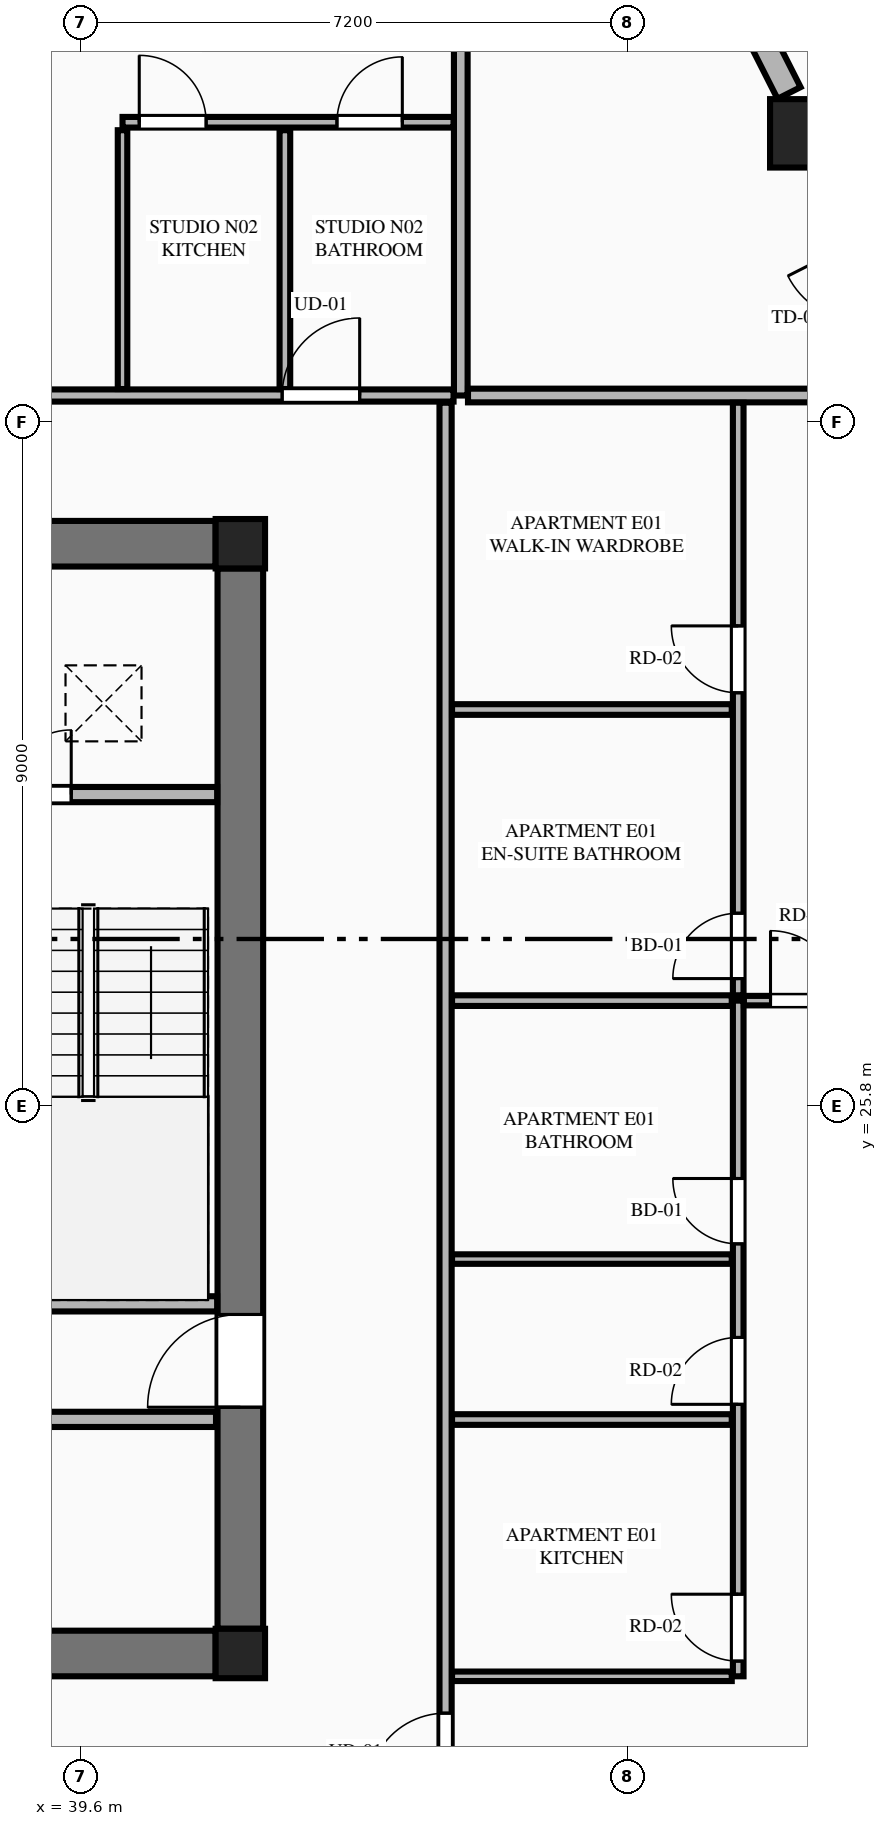
"""IFC4 building model, lengths in metres.
Left out: names, types, materials, properties, quantities, classifications, styles, units other than length and angle.
Written with IfcOpenShell. Run it as: python <this file> out.ifc"""

import sys

from ifc_helpers import new_model, si_unit, direction, frame, frame_2d, origin, origin_2d, place, context, subcontext, project, spatial, rectangle, extrude, element, fill, save


model = new_model("IFC4")
c1 = context("Model", 3, precision=1e-05, world=origin(), true_north=direction((0.0, 1.0)))
c2 = subcontext(c1, "Body", "Model", "MODEL_VIEW")
j1 = project(units=[si_unit("LENGTHUNIT", "METRE"), si_unit("PLANEANGLEUNIT", "RADIAN")], contexts=[c1])
p1 = place(None, origin())
s1 = spatial("IfcSite", under=j1, at=p1, CompositionType="ELEMENT")
p2 = place(p1, origin())
s2 = spatial("IfcBuilding", under=s1, at=p2, CompositionType="ELEMENT")
p3 = place(p2, frame((0.0, 0.0, 175.45)))
s3 = spatial("IfcBuildingStorey", under=s2, at=p3, CompositionType="ELEMENT", Elevation=175.45)
for number, where, z_axis, x_axis in (
    (1, (41.7, 18.6, 0.0), (0.0, 0.0, 1.0), (1.0, 0.0, 0.0)),
    (2, (41.7, 33.2, 0.0), (0.0, 0.0, 1.0), (1.0, 0.0, 0.0)),
):
    element("IfcColumn", number, at=place(p3, frame(where, z_axis=z_axis, x_axis=x_axis)), inside=s3, PredefinedType="COLUMN", context=c2, shape_type="SweptSolid", body=[
        extrude(rectangle(XDim=0.65, YDim=0.65, at=origin_2d()), origin(), (0.0, 0.0, 1.0), 3.55),
    ])
for number, where, z_axis, x_axis in (
    (3, (23.425, 18.6, 0.0), (0.0, 0.0, 1.0), (1.0, 0.0, 0.0)),
    (4, (23.425, 33.2, 0.0), (0.0, 0.0, 1.0), (1.0, 0.0, 0.0)),
):
    element("IfcWall", number, at=place(p3, frame(where, z_axis=z_axis, x_axis=x_axis)), inside=s3, PredefinedType="SHEAR", context=c2, shape_type="SweptSolid", body=[
        extrude(rectangle(XDim=17.95, YDim=0.6, at=frame_2d((8.975, 0.0))), origin(), (0.0, 0.0, 1.0), 3.35),
    ])
p4 = place(p3, frame((41.7, 18.925, 0.0), z_axis=(0.0, 0.0, 1.0), x_axis=(0.0, 1.0, 0.0)))
e5 = element("IfcWall", 5, at=p4, inside=s3, PredefinedType="SHEAR", context=c2, shape_type="SweptSolid", body=[
    extrude(rectangle(XDim=13.95, YDim=0.6, at=frame_2d((6.975, 0.0))), origin(), (0.0, 0.0, 1.0), 3.35),
])
p5 = place(p4, frame((2.915, 0.0, 0.0)))
e6 = element("IfcOpeningElement", 6, at=p5, cuts=e5, PredefinedType="OPENING", context=c2, shape_type="SweptSolid", body=[
    extrude(rectangle(XDim=1.22, YDim=2.25, at=frame_2d((0.61, 1.125))), frame((0.0, 0.31, 0.0), z_axis=(0.0, -1.0, 0.0), x_axis=(1.0, 0.0, 0.0)), (0.0, 0.0, 1.0), 0.62),
])
p6 = place(p3, frame((49.119, 38.599, 0.0), z_axis=(0.0, 0.0, 1.0), x_axis=(1.0, 0.0, 0.0)))
e7 = element("IfcColumn", 7, at=p6, inside=s3, PredefinedType="COLUMN", context=c2, shape_type="SweptSolid", body=[
    extrude(rectangle(XDim=0.9, YDim=0.9, at=origin_2d()), origin(), (0.0, 0.0, 1.0), 3.55),
])
p7 = place(p3, frame((38.125, 23.2, 0.0), z_axis=(0.0, 0.0, 1.0), x_axis=(1.0, 0.0, 0.0)))
e8 = element("IfcWall", 8, at=p7, inside=s3, PredefinedType="PLUMBINGWALL", context=c2, shape_type="SweptSolid", body=[
    extrude(rectangle(XDim=3.27, YDim=0.2, at=frame_2d((1.635, 0.0))), origin(), (0.0, 0.0, 1.0), 3.35),
])
p8 = place(p3, frame((38.125, 29.9, 0.0), z_axis=(0.0, 0.0, 1.0), x_axis=(1.0, 0.0, 0.0)))
e9 = element("IfcWall", 9, at=p8, inside=s3, PredefinedType="PLUMBINGWALL", context=c2, shape_type="SweptSolid", body=[
    extrude(rectangle(XDim=3.27, YDim=0.2, at=frame_2d((1.635, 0.0))), origin(), (0.0, 0.0, 1.0), 3.35),
])
p9 = place(p8, frame((0.5, 0.0, 0.0)))
e10 = element("IfcOpeningElement", 10, at=p9, cuts=e9, PredefinedType="OPENING", context=c2, shape_type="SweptSolid", body=[
    extrude(rectangle(XDim=0.85, YDim=2.05, at=frame_2d((0.425, 1.025))), frame((0.0, 0.11, 0.0), z_axis=(0.0, -1.0, 0.0), x_axis=(1.0, 0.0, 0.0)), (0.0, 0.0, 1.0), 0.22),
])
p10 = place(p3, frame((23.42, 21.68, 0.0), z_axis=(0.0, 0.0, 1.0), x_axis=(1.0, 0.0, 0.0)))
e11 = element("IfcWall", 11, at=p10, inside=s3, PredefinedType="PLUMBINGWALL", context=c2, shape_type="SweptSolid", body=[
    extrude(rectangle(XDim=17.96, YDim=0.2, at=frame_2d((8.98, 0.0))), origin(), (0.0, 0.0, 1.0), 3.35),
])
p11 = place(p10, frame((0.46, 0.0, 0.0)))
e12 = element("IfcOpeningElement", 12, at=p11, cuts=e11, PredefinedType="OPENING", context=c2, shape_type="SweptSolid", body=[
    extrude(rectangle(XDim=0.92, YDim=2.15, at=frame_2d((0.46, 1.075))), frame((0.0, 0.11, 0.0), z_axis=(0.0, -1.0, 0.0), x_axis=(1.0, 0.0, 0.0)), (0.0, 0.0, 1.0), 0.22),
])
p12 = place(p10, frame((9.48, 0.0, 0.0)))
e13 = element("IfcOpeningElement", 13, at=p12, cuts=e11, PredefinedType="OPENING", context=c2, shape_type="SweptSolid", body=[
    extrude(rectangle(XDim=0.92, YDim=2.15, at=frame_2d((0.46, 1.075))), frame((0.0, 0.11, 0.0), z_axis=(0.0, -1.0, 0.0), x_axis=(1.0, 0.0, 0.0)), (0.0, 0.0, 1.0), 0.22),
])
p13 = place(p3, frame((48.919, 39.13, 0.0), z_axis=(0.0, 0.0, 1.0), x_axis=(-0.45150207307, 0.892270070109, 0.0)))
e14 = element("IfcWall", 14, at=p13, inside=s3, PredefinedType="STANDARD", context=c2, shape_type="SweptSolid", body=[
    extrude(rectangle(XDim=4.731, YDim=0.34, at=frame_2d((2.365, 0.0))), origin(), (0.0, 0.0, 1.0), 2.883),
])
p14 = place(p13, frame((1.74, 0.0, 0.75)))
e15 = element("IfcOpeningElement", 15, at=p14, cuts=e14, PredefinedType="OPENING", context=c2, shape_type="SweptSolid", body=[
    extrude(rectangle(XDim=1.25, YDim=1.95, at=frame_2d((0.625, 0.975))), frame((0.0, 0.18, 0.0), z_axis=(0.0, -1.0, 0.0), x_axis=(1.0, 0.0, 0.0)), (0.0, 0.0, 1.0), 0.36),
])
p15 = place(p3, frame((44.6, 35.15, 0.0), z_axis=(0.0, 0.0, 1.0), x_axis=(0.0, 1.0, 0.0)))
e16 = element("IfcWall", 16, at=p15, inside=s3, PredefinedType="PARTITIONING", context=c2, shape_type="SweptSolid", body=[
    extrude(rectangle(XDim=10.482, YDim=0.18, at=frame_2d((5.241, 0.0))), origin(), (0.0, 0.0, 1.0), 3.35),
])
p16 = place(p3, frame((36.038, 35.15, 0.0), z_axis=(0.0, 0.0, 1.0), x_axis=(1.0, 0.0, 0.0)))
e17 = element("IfcWall", 17, at=p16, inside=s3, PredefinedType="PARTITIONING", context=c2, shape_type="SweptSolid", body=[
    extrude(rectangle(XDim=8.467, YDim=0.16, at=frame_2d((4.233, 0.0))), origin(), (0.0, 0.0, 1.0), 3.35),
])
p17 = place(p16, frame((6.212, 0.0, 0.0)))
e18 = element("IfcOpeningElement", 18, at=p17, cuts=e17, PredefinedType="OPENING", context=c2, shape_type="SweptSolid", body=[
    extrude(rectangle(XDim=1.02, YDim=2.25, at=frame_2d((0.51, 1.125))), frame((0.0, 0.09, 0.0), z_axis=(0.0, -1.0, 0.0), x_axis=(1.0, 0.0, 0.0)), (0.0, 0.0, 1.0), 0.18),
])
p18 = place(p3, frame((40.15, 35.235, 0.0), z_axis=(0.0, 0.0, 1.0), x_axis=(0.0, 1.0, 0.0)))
e19 = element("IfcWall", 19, at=p18, inside=s3, PredefinedType="PARTITIONING", context=c2, shape_type="SweptSolid", body=[
    extrude(rectangle(XDim=3.405, YDim=0.125, at=frame_2d((1.702, 0.0))), origin(), (0.0, 0.0, 1.0), 3.35),
])
p19 = place(p3, frame((40.15, 38.745, 0.0), z_axis=(0.0, 0.0, 1.0), x_axis=(1.0, 0.0, 0.0)))
e20 = element("IfcWall", 20, at=p19, inside=s3, PredefinedType="PLUMBINGWALL", context=c2, shape_type="SweptSolid", body=[
    extrude(rectangle(XDim=4.355, YDim=0.14, at=frame_2d((2.177, 0.0))), origin(), (0.0, 0.0, 1.0), 3.35),
])
p20 = place(p19, frame((2.821, 0.0, 0.0)))
e21 = element("IfcOpeningElement", 21, at=p20, cuts=e20, PredefinedType="OPENING", context=c2, shape_type="SweptSolid", body=[
    extrude(rectangle(XDim=0.86, YDim=2.1, at=frame_2d((0.43, 1.05))), frame((0.0, 0.08, 0.0), z_axis=(0.0, -1.0, 0.0), x_axis=(1.0, 0.0, 0.0)), (0.0, 0.0, 1.0), 0.16),
])
p21 = place(p19, frame((0.22, 0.0, 0.0)))
e22 = element("IfcOpeningElement", 22, at=p21, cuts=e20, PredefinedType="OPENING", context=c2, shape_type="SweptSolid", body=[
    extrude(rectangle(XDim=0.88, YDim=2.15, at=frame_2d((0.44, 1.075))), frame((0.0, 0.08, 0.0), z_axis=(0.0, -1.0, 0.0), x_axis=(1.0, 0.0, 0.0)), (0.0, 0.0, 1.0), 0.16),
])
p22 = place(p3, frame((42.286, 35.235, 0.0), z_axis=(0.0, 0.0, 1.0), x_axis=(0.0, 1.0, 0.0)))
e23 = element("IfcWall", 23, at=p22, inside=s3, PredefinedType="PLUMBINGWALL", context=c2, shape_type="SweptSolid", body=[
    extrude(rectangle(XDim=3.405, YDim=0.14, at=frame_2d((1.702, 0.0))), origin(), (0.0, 0.0, 1.0), 2.807),
])
p23 = place(p3, frame((44.695, 35.15, 0.0), z_axis=(0.0, 0.0, 1.0), x_axis=(1.0, 0.0, 0.0)))
e24 = element("IfcWall", 24, at=p23, inside=s3, PredefinedType="PARTITIONING", context=c2, shape_type="SweptSolid", body=[
    extrude(rectangle(XDim=5.995, YDim=0.18, at=frame_2d((2.998, 0.0))), origin(), (0.0, 0.0, 1.0), 3.35),
])
p24 = place(p3, frame((44.4, 16.345, 0.0), z_axis=(0.0, 0.0, 1.0), x_axis=(0.0, 1.0, 0.0)))
e25 = element("IfcWall", 25, at=p24, inside=s3, PredefinedType="PARTITIONING", context=c2, shape_type="SweptSolid", body=[
    extrude(rectangle(XDim=18.71, YDim=0.16, at=frame_2d((9.355, 0.0))), origin(), (0.0, 0.0, 1.0), 3.35),
])
p25 = place(p24, frame((0.45, 0.0, 0.0)))
e26 = element("IfcOpeningElement", 26, at=p25, cuts=e25, PredefinedType="OPENING", context=c2, shape_type="SweptSolid", body=[
    extrude(rectangle(XDim=1.02, YDim=2.25, at=frame_2d((0.51, 1.125))), frame((0.0, 0.09, 0.0), z_axis=(0.0, -1.0, 0.0), x_axis=(1.0, 0.0, 0.0)), (0.0, 0.0, 1.0), 0.18),
])
p26 = place(p3, frame((44.485, 18.3, 0.0), z_axis=(0.0, 0.0, 1.0), x_axis=(1.0, 0.0, 0.0)))
e27 = element("IfcWall", 27, at=p26, inside=s3, PredefinedType="PARTITIONING", context=c2, shape_type="SweptSolid", body=[
    extrude(rectangle(XDim=3.68, YDim=0.125, at=frame_2d((1.84, 0.0))), origin(), (0.0, 0.0, 1.0), 2.807),
])
p27 = place(p3, frame((48.25, 18.3, 0.0), z_axis=(0.0, 0.0, 1.0), x_axis=(0.0, 1.0, 0.0)))
e28 = element("IfcWall", 28, at=p27, inside=s3, PredefinedType="PLUMBINGWALL", context=c2, shape_type="SweptSolid", body=[
    extrude(rectangle(XDim=8.889, YDim=0.14, at=frame_2d((4.444, 0.0))), origin(), (0.0, 0.0, 1.0), 3.35),
])
p28 = place(p27, frame((0.2, 0.0, 0.0)))
e29 = element("IfcOpeningElement", 29, at=p28, cuts=e28, PredefinedType="OPENING", context=c2, shape_type="SweptSolid", body=[
    extrude(rectangle(XDim=0.88, YDim=2.15, at=frame_2d((0.44, 1.075))), frame((0.0, 0.08, 0.0), z_axis=(0.0, -1.0, 0.0), x_axis=(1.0, 0.0, 0.0)), (0.0, 0.0, 1.0), 0.16),
])
p29 = place(p27, frame((3.578, 0.0, 0.0)))
e30 = element("IfcOpeningElement", 30, at=p29, cuts=e28, PredefinedType="OPENING", context=c2, shape_type="SweptSolid", body=[
    extrude(rectangle(XDim=0.88, YDim=2.15, at=frame_2d((0.44, 1.075))), frame((0.0, 0.08, 0.0), z_axis=(0.0, -1.0, 0.0), x_axis=(1.0, 0.0, 0.0)), (0.0, 0.0, 1.0), 0.16),
])
p30 = place(p27, frame((5.689, 0.0, 0.0)))
e31 = element("IfcOpeningElement", 31, at=p30, cuts=e28, PredefinedType="OPENING", context=c2, shape_type="SweptSolid", body=[
    extrude(rectangle(XDim=0.86, YDim=2.1, at=frame_2d((0.43, 1.05))), frame((0.0, 0.08, 0.0), z_axis=(0.0, -1.0, 0.0), x_axis=(1.0, 0.0, 0.0)), (0.0, 0.0, 1.0), 0.16),
])
p31 = place(p3, frame((48.25, 27.259, 0.0), z_axis=(0.0, 0.0, 1.0), x_axis=(0.0, 1.0, 0.0)))
e32 = element("IfcWall", 32, at=p31, inside=s3, PredefinedType="PLUMBINGWALL", context=c2, shape_type="SweptSolid", body=[
    extrude(rectangle(XDim=7.796, YDim=0.14, at=frame_2d((3.898, 0.0))), origin(), (0.0, 0.0, 1.0), 3.35),
])
p32 = place(p31, frame((0.22, 0.0, 0.0)))
e33 = element("IfcOpeningElement", 33, at=p32, cuts=e32, PredefinedType="OPENING", context=c2, shape_type="SweptSolid", body=[
    extrude(rectangle(XDim=0.86, YDim=2.1, at=frame_2d((0.43, 1.05))), frame((0.0, 0.08, 0.0), z_axis=(0.0, -1.0, 0.0), x_axis=(1.0, 0.0, 0.0)), (0.0, 0.0, 1.0), 0.16),
])
p33 = place(p31, frame((3.98, 0.0, 0.0)))
e34 = element("IfcOpeningElement", 34, at=p33, cuts=e32, PredefinedType="OPENING", context=c2, shape_type="SweptSolid", body=[
    extrude(rectangle(XDim=0.88, YDim=2.15, at=frame_2d((0.44, 1.075))), frame((0.0, 0.08, 0.0), z_axis=(0.0, -1.0, 0.0), x_axis=(1.0, 0.0, 0.0)), (0.0, 0.0, 1.0), 0.16),
])
p34 = place(p3, frame((44.485, 27.189, 0.0), z_axis=(0.0, 0.0, 1.0), x_axis=(1.0, 0.0, 0.0)))
e35 = element("IfcWall", 35, at=p34, inside=s3, PredefinedType="PLUMBINGWALL", context=c2, shape_type="SweptSolid", body=[
    extrude(rectangle(XDim=3.68, YDim=0.14, at=frame_2d((1.84, 0.0))), origin(), (0.0, 0.0, 1.0), 3.35),
])
p35 = place(p3, frame((48.325, 27.189, 0.0), z_axis=(0.0, 0.0, 1.0), x_axis=(1.0, 0.0, 0.0)))
e36 = element("IfcWall", 36, at=p35, inside=s3, PredefinedType="PARTITIONING", context=c2, shape_type="SweptSolid", body=[
    extrude(rectangle(XDim=6.408, YDim=0.125, at=frame_2d((3.204, 0.0))), origin(), (0.0, 0.0, 1.0), 3.35),
])
p36 = place(p35, frame((0.35, 0.0, 0.0)))
e37 = element("IfcOpeningElement", 37, at=p36, cuts=e36, PredefinedType="OPENING", context=c2, shape_type="SweptSolid", body=[
    extrude(rectangle(XDim=0.92, YDim=2.15, at=frame_2d((0.46, 1.075))), frame((0.0, 0.073, 0.0), z_axis=(0.0, -1.0, 0.0), x_axis=(1.0, 0.0, 0.0)), (0.0, 0.0, 1.0), 0.145),
])
p37 = place(p3, frame((44.485, 21.678, 0.0), z_axis=(0.0, 0.0, 1.0), x_axis=(1.0, 0.0, 0.0)))
e38 = element("IfcWall", 38, at=p37, inside=s3, PredefinedType="PLUMBINGWALL", context=c2, shape_type="SweptSolid", body=[
    extrude(rectangle(XDim=3.68, YDim=0.14, at=frame_2d((1.84, 0.0))), origin(), (0.0, 0.0, 1.0), 3.35),
])
p38 = place(p3, frame((44.485, 23.789, 0.0), z_axis=(0.0, 0.0, 1.0), x_axis=(1.0, 0.0, 0.0)))
e39 = element("IfcWall", 39, at=p38, inside=s3, PredefinedType="PARTITIONING", context=c2, shape_type="SweptSolid", body=[
    extrude(rectangle(XDim=3.68, YDim=0.125, at=frame_2d((1.84, 0.0))), origin(), (0.0, 0.0, 1.0), 2.807),
])
p39 = place(p3, frame((44.485, 31.019, 0.0), z_axis=(0.0, 0.0, 1.0), x_axis=(1.0, 0.0, 0.0)))
e40 = element("IfcWall", 40, at=p39, inside=s3, PredefinedType="PLUMBINGWALL", context=c2, shape_type="SweptSolid", body=[
    extrude(rectangle(XDim=3.68, YDim=0.14, at=frame_2d((1.84, 0.0))), origin(), (0.0, 0.0, 1.0), 3.35),
])
p40 = place(p5, origin())
e41 = element("IfcDoor", 41, at=p40, inside=s3, OperationType="SINGLE_SWING_LEFT", PredefinedType="DOOR", context=c2, shape_type="SweptSolid", body=[
    extrude(rectangle(XDim=1.22, YDim=2.25, at=frame_2d((0.61, 1.125))), frame((0.0, 0.025, 0.0), z_axis=(0.0, -1.0, 0.0), x_axis=(1.0, 0.0, 0.0)), (0.0, 0.0, 1.0), 0.05),
])
fill(e6, e41)
p41 = place(p9, origin())
e42 = element("IfcDoor", 42, at=p41, inside=s3, OperationType="SINGLE_SWING_RIGHT", PredefinedType="DOOR", context=c2, shape_type="SweptSolid", body=[
    extrude(rectangle(XDim=0.85, YDim=2.05, at=frame_2d((0.425, 1.025))), frame((0.0, 0.025, 0.0), z_axis=(0.0, -1.0, 0.0), x_axis=(1.0, 0.0, 0.0)), (0.0, 0.0, 1.0), 0.05),
])
fill(e10, e42)
p42 = place(p20, origin())
e43 = element("IfcDoor", 43, at=p42, inside=s3, OperationType="SINGLE_SWING_RIGHT", PredefinedType="DOOR", context=c2, shape_type="SweptSolid", body=[
    extrude(rectangle(XDim=0.86, YDim=2.1, at=frame_2d((0.43, 1.05))), frame((0.0, 0.025, 0.0), z_axis=(0.0, -1.0, 0.0), x_axis=(1.0, 0.0, 0.0)), (0.0, 0.0, 1.0), 0.05),
])
fill(e21, e43)
p43 = place(p17, origin())
e44 = element("IfcDoor", 44, at=p43, inside=s3, OperationType="SINGLE_SWING_RIGHT", PredefinedType="DOOR", context=c2, shape_type="SweptSolid", body=[
    extrude(rectangle(XDim=1.02, YDim=2.25, at=frame_2d((0.51, 1.125))), frame((0.0, 0.025, 0.0), z_axis=(0.0, -1.0, 0.0), x_axis=(1.0, 0.0, 0.0)), (0.0, 0.0, 1.0), 0.05),
])
fill(e18, e44)
p44 = place(p21, origin())
e45 = element("IfcDoor", 45, at=p44, inside=s3, OperationType="SINGLE_SWING_LEFT", PredefinedType="DOOR", context=c2, shape_type="SweptSolid", body=[
    extrude(rectangle(XDim=0.88, YDim=2.15, at=frame_2d((0.44, 1.075))), frame((0.0, 0.025, 0.0), z_axis=(0.0, -1.0, 0.0), x_axis=(1.0, 0.0, 0.0)), (0.0, 0.0, 1.0), 0.05),
])
fill(e22, e45)
p45 = place(p28, origin())
e46 = element("IfcDoor", 46, at=p45, inside=s3, OperationType="SINGLE_SWING_RIGHT", PredefinedType="DOOR", context=c2, shape_type="SweptSolid", body=[
    extrude(rectangle(XDim=0.88, YDim=2.15, at=frame_2d((0.44, 1.075))), frame((0.0, 0.025, 0.0), z_axis=(0.0, -1.0, 0.0), x_axis=(1.0, 0.0, 0.0)), (0.0, 0.0, 1.0), 0.05),
])
fill(e29, e46)
p46 = place(p29, origin())
e47 = element("IfcDoor", 47, at=p46, inside=s3, OperationType="SINGLE_SWING_LEFT", PredefinedType="DOOR", context=c2, shape_type="SweptSolid", body=[
    extrude(rectangle(XDim=0.88, YDim=2.15, at=frame_2d((0.44, 1.075))), frame((0.0, 0.025, 0.0), z_axis=(0.0, -1.0, 0.0), x_axis=(1.0, 0.0, 0.0)), (0.0, 0.0, 1.0), 0.05),
])
fill(e30, e47)
p47 = place(p30, origin())
e48 = element("IfcDoor", 48, at=p47, inside=s3, OperationType="SINGLE_SWING_RIGHT", PredefinedType="DOOR", context=c2, shape_type="SweptSolid", body=[
    extrude(rectangle(XDim=0.86, YDim=2.1, at=frame_2d((0.43, 1.05))), frame((0.0, 0.025, 0.0), z_axis=(0.0, -1.0, 0.0), x_axis=(1.0, 0.0, 0.0)), (0.0, 0.0, 1.0), 0.05),
])
fill(e31, e48)
p48 = place(p32, origin())
e49 = element("IfcDoor", 49, at=p48, inside=s3, OperationType="SINGLE_SWING_LEFT", PredefinedType="DOOR", context=c2, shape_type="SweptSolid", body=[
    extrude(rectangle(XDim=0.86, YDim=2.1, at=frame_2d((0.43, 1.05))), frame((0.0, 0.025, 0.0), z_axis=(0.0, -1.0, 0.0), x_axis=(1.0, 0.0, 0.0)), (0.0, 0.0, 1.0), 0.05),
])
fill(e33, e49)
p49 = place(p33, origin())
e50 = element("IfcDoor", 50, at=p49, inside=s3, OperationType="SINGLE_SWING_RIGHT", PredefinedType="DOOR", context=c2, shape_type="SweptSolid", body=[
    extrude(rectangle(XDim=0.88, YDim=2.15, at=frame_2d((0.44, 1.075))), frame((0.0, 0.025, 0.0), z_axis=(0.0, -1.0, 0.0), x_axis=(1.0, 0.0, 0.0)), (0.0, 0.0, 1.0), 0.05),
])
fill(e34, e50)
p50 = place(p25, origin())
e51 = element("IfcDoor", 51, at=p50, inside=s3, OperationType="SINGLE_SWING_LEFT", PredefinedType="DOOR", context=c2, shape_type="SweptSolid", body=[
    extrude(rectangle(XDim=1.02, YDim=2.25, at=frame_2d((0.51, 1.125))), frame((0.0, 0.025, 0.0), z_axis=(0.0, -1.0, 0.0), x_axis=(1.0, 0.0, 0.0)), (0.0, 0.0, 1.0), 0.05),
])
fill(e26, e51)
p51 = place(p36, origin())
e52 = element("IfcDoor", 52, at=p51, inside=s3, OperationType="SINGLE_SWING_LEFT", PredefinedType="DOOR", context=c2, shape_type="SweptSolid", body=[
    extrude(rectangle(XDim=0.92, YDim=2.15, at=frame_2d((0.46, 1.075))), frame((0.0, 0.025, 0.0), z_axis=(0.0, -1.0, 0.0), x_axis=(1.0, 0.0, 0.0)), (0.0, 0.0, 1.0), 0.05),
])
fill(e37, e52)
save(model, sys.argv[1])
